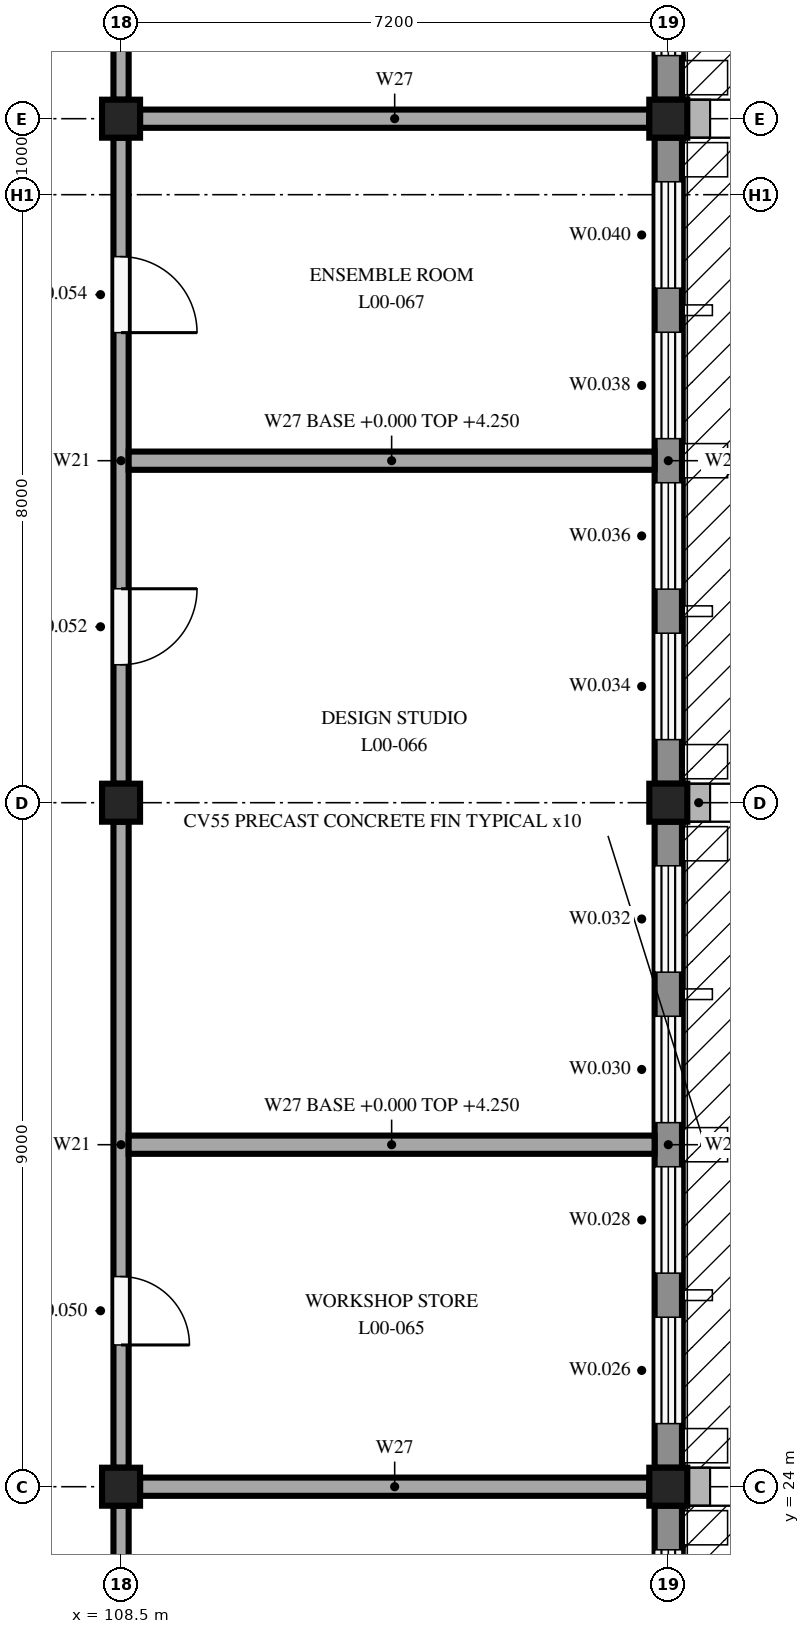
"""IFC4 building model, lengths in metres.
Left out: names, types, materials, properties, quantities, classifications, styles, units other than length and angle.
Written with IfcOpenShell. Run it as: python <this file> out.ifc"""

import sys

from ifc_helpers import new_model, si_unit, direction, frame, frame_2d, origin, origin_2d, place, context, subcontext, project, spatial, rectangle, extrude, element, fill, save


model = new_model("IFC4")
c1 = context("Model", 3, precision=1e-05, world=origin(), true_north=direction((0.0, 1.0)))
c2 = subcontext(c1, "Body", "Model", "MODEL_VIEW")
j1 = project(units=[si_unit("LENGTHUNIT", "METRE"), si_unit("PLANEANGLEUNIT", "RADIAN")], contexts=[c1])
p1 = place(None, origin())
s1 = spatial("IfcSite", under=j1, at=p1, CompositionType="ELEMENT")
p2 = place(p1, origin())
s2 = spatial("IfcBuilding", under=s1, at=p2, CompositionType="ELEMENT")
p3 = place(p2, origin())
s3 = spatial("IfcBuildingStorey", under=s2, at=p3, CompositionType="ELEMENT", Elevation=0.0)
for number, where, z_axis, x_axis in (
    (1, (108.5, 24.0, 0.0), (0.0, 0.0, 1.0), (1.0, 0.0, 0.0)),
    (2, (108.5, 33.0, 0.0), (0.0, 0.0, 1.0), (1.0, 0.0, 0.0)),
    (3, (108.5, 42.0, 0.0), (0.0, 0.0, 1.0), (1.0, 0.0, 0.0)),
    (4, (115.7, 24.0, 0.0), (0.0, 0.0, 1.0), (1.0, 0.0, 0.0)),
    (5, (115.7, 33.0, 0.0), (0.0, 0.0, 1.0), (1.0, 0.0, 0.0)),
    (6, (115.7, 42.0, 0.0), (0.0, 0.0, 1.0), (1.0, 0.0, 0.0)),
):
    element("IfcColumn", number, at=place(p3, frame(where, z_axis=z_axis, x_axis=x_axis)), inside=s3, PredefinedType="COLUMN", context=c2, shape_type="SweptSolid", body=[
        extrude(rectangle(XDim=0.5, YDim=0.5, at=origin_2d()), origin(), (0.0, 0.0, 1.0), 4.25),
    ])
p4 = place(p3, frame((115.7, 23.75, 0.0), z_axis=(0.0, 0.0, 1.0), x_axis=(0.0, -1.0, 0.0)))
e7 = element("IfcWall", 7, at=p4, inside=s3, PredefinedType="STANDARD", context=c2, shape_type="SweptSolid", body=[
    extrude(rectangle(XDim=8.5, YDim=0.36, at=frame_2d((4.25, 0.0))), origin(), (0.0, 0.0, 1.0), 3.75),
])
p5 = place(p4, frame((6.52, 0.0, 1.2)))
e8 = element("IfcOpeningElement", 8, at=p5, cuts=e7, PredefinedType="OPENING", context=c2, shape_type="SweptSolid", body=[
    extrude(rectangle(XDim=1.4, YDim=2.4, at=frame_2d((0.7, 1.2))), frame((0.0, 0.19, 0.0), z_axis=(0.0, -1.0, 0.0), x_axis=(1.0, 0.0, 0.0)), (0.0, 0.0, 1.0), 0.38),
])
p6 = place(p4, frame((4.54, 0.0, 1.2)))
e9 = element("IfcOpeningElement", 9, at=p6, cuts=e7, PredefinedType="OPENING", context=c2, shape_type="SweptSolid", body=[
    extrude(rectangle(XDim=1.4, YDim=2.4, at=frame_2d((0.7, 1.2))), frame((0.0, 0.19, 0.0), z_axis=(0.0, -1.0, 0.0), x_axis=(1.0, 0.0, 0.0)), (0.0, 0.0, 1.0), 0.38),
])
p7 = place(p4, frame((2.56, 0.0, 1.2)))
e10 = element("IfcOpeningElement", 10, at=p7, cuts=e7, PredefinedType="OPENING", context=c2, shape_type="SweptSolid", body=[
    extrude(rectangle(XDim=1.4, YDim=2.4, at=frame_2d((0.7, 1.2))), frame((0.0, 0.19, 0.0), z_axis=(0.0, -1.0, 0.0), x_axis=(1.0, 0.0, 0.0)), (0.0, 0.0, 1.0), 0.38),
])
p8 = place(p4, frame((0.58, 0.0, 1.2)))
e11 = element("IfcOpeningElement", 11, at=p8, cuts=e7, PredefinedType="OPENING", context=c2, shape_type="SweptSolid", body=[
    extrude(rectangle(XDim=1.4, YDim=2.4, at=frame_2d((0.7, 1.2))), frame((0.0, 0.19, 0.0), z_axis=(0.0, -1.0, 0.0), x_axis=(1.0, 0.0, 0.0)), (0.0, 0.0, 1.0), 0.38),
])
p9 = place(p3, frame((115.7, 32.75, 0.0), z_axis=(0.0, 0.0, 1.0), x_axis=(0.0, -1.0, 0.0)))
e12 = element("IfcWall", 12, at=p9, inside=s3, PredefinedType="STANDARD", context=c2, shape_type="SweptSolid", body=[
    extrude(rectangle(XDim=8.5, YDim=0.36, at=frame_2d((4.25, 0.0))), origin(), (0.0, 0.0, 1.0), 3.75),
])
p10 = place(p9, frame((6.52, 0.0, 1.2)))
e13 = element("IfcOpeningElement", 13, at=p10, cuts=e12, PredefinedType="OPENING", context=c2, shape_type="SweptSolid", body=[
    extrude(rectangle(XDim=1.4, YDim=2.4, at=frame_2d((0.7, 1.2))), frame((0.0, 0.19, 0.0), z_axis=(0.0, -1.0, 0.0), x_axis=(1.0, 0.0, 0.0)), (0.0, 0.0, 1.0), 0.38),
])
p11 = place(p9, frame((4.54, 0.0, 1.2)))
e14 = element("IfcOpeningElement", 14, at=p11, cuts=e12, PredefinedType="OPENING", context=c2, shape_type="SweptSolid", body=[
    extrude(rectangle(XDim=1.4, YDim=2.4, at=frame_2d((0.7, 1.2))), frame((0.0, 0.19, 0.0), z_axis=(0.0, -1.0, 0.0), x_axis=(1.0, 0.0, 0.0)), (0.0, 0.0, 1.0), 0.38),
])
p12 = place(p9, frame((2.56, 0.0, 1.2)))
e15 = element("IfcOpeningElement", 15, at=p12, cuts=e12, PredefinedType="OPENING", context=c2, shape_type="SweptSolid", body=[
    extrude(rectangle(XDim=1.4, YDim=2.4, at=frame_2d((0.7, 1.2))), frame((0.0, 0.19, 0.0), z_axis=(0.0, -1.0, 0.0), x_axis=(1.0, 0.0, 0.0)), (0.0, 0.0, 1.0), 0.38),
])
p13 = place(p9, frame((0.58, 0.0, 1.2)))
e16 = element("IfcOpeningElement", 16, at=p13, cuts=e12, PredefinedType="OPENING", context=c2, shape_type="SweptSolid", body=[
    extrude(rectangle(XDim=1.4, YDim=2.4, at=frame_2d((0.7, 1.2))), frame((0.0, 0.19, 0.0), z_axis=(0.0, -1.0, 0.0), x_axis=(1.0, 0.0, 0.0)), (0.0, 0.0, 1.0), 0.38),
])
p14 = place(p3, frame((115.7, 41.75, 0.0), z_axis=(0.0, 0.0, 1.0), x_axis=(0.0, -1.0, 0.0)))
e17 = element("IfcWall", 17, at=p14, inside=s3, PredefinedType="STANDARD", context=c2, shape_type="SweptSolid", body=[
    extrude(rectangle(XDim=8.5, YDim=0.36, at=frame_2d((4.25, 0.0))), origin(), (0.0, 0.0, 1.0), 3.75),
])
p15 = place(p14, frame((6.52, 0.0, 1.2)))
e18 = element("IfcOpeningElement", 18, at=p15, cuts=e17, PredefinedType="OPENING", context=c2, shape_type="SweptSolid", body=[
    extrude(rectangle(XDim=1.4, YDim=2.4, at=frame_2d((0.7, 1.2))), frame((0.0, 0.19, 0.0), z_axis=(0.0, -1.0, 0.0), x_axis=(1.0, 0.0, 0.0)), (0.0, 0.0, 1.0), 0.38),
])
p16 = place(p14, frame((4.54, 0.0, 1.2)))
e19 = element("IfcOpeningElement", 19, at=p16, cuts=e17, PredefinedType="OPENING", context=c2, shape_type="SweptSolid", body=[
    extrude(rectangle(XDim=1.4, YDim=2.4, at=frame_2d((0.7, 1.2))), frame((0.0, 0.19, 0.0), z_axis=(0.0, -1.0, 0.0), x_axis=(1.0, 0.0, 0.0)), (0.0, 0.0, 1.0), 0.38),
])
p17 = place(p14, frame((2.56, 0.0, 1.2)))
e20 = element("IfcOpeningElement", 20, at=p17, cuts=e17, PredefinedType="OPENING", context=c2, shape_type="SweptSolid", body=[
    extrude(rectangle(XDim=1.4, YDim=2.4, at=frame_2d((0.7, 1.2))), frame((0.0, 0.19, 0.0), z_axis=(0.0, -1.0, 0.0), x_axis=(1.0, 0.0, 0.0)), (0.0, 0.0, 1.0), 0.38),
])
p18 = place(p14, frame((0.58, 0.0, 1.2)))
e21 = element("IfcOpeningElement", 21, at=p18, cuts=e17, PredefinedType="OPENING", context=c2, shape_type="SweptSolid", body=[
    extrude(rectangle(XDim=1.4, YDim=2.4, at=frame_2d((0.7, 1.2))), frame((0.0, 0.19, 0.0), z_axis=(0.0, -1.0, 0.0), x_axis=(1.0, 0.0, 0.0)), (0.0, 0.0, 1.0), 0.38),
])
p19 = place(p3, frame((115.7, 50.75, 0.0), z_axis=(0.0, 0.0, 1.0), x_axis=(0.0, -1.0, 0.0)))
e22 = element("IfcWall", 22, at=p19, inside=s3, PredefinedType="STANDARD", context=c2, shape_type="SweptSolid", body=[
    extrude(rectangle(XDim=8.5, YDim=0.36, at=frame_2d((4.25, 0.0))), origin(), (0.0, 0.0, 1.0), 3.75),
])
p20 = place(p19, frame((6.52, 0.0, 0.6)))
e23 = element("IfcOpeningElement", 23, at=p20, cuts=e22, PredefinedType="OPENING", context=c2, shape_type="SweptSolid", body=[
    extrude(rectangle(XDim=1.4, YDim=3.0, at=frame_2d((0.7, 1.5))), frame((0.0, 0.19, 0.0), z_axis=(0.0, -1.0, 0.0), x_axis=(1.0, 0.0, 0.0)), (0.0, 0.0, 1.0), 0.38),
])
p21 = place(p19, frame((4.54, 0.0, 0.6)))
e24 = element("IfcOpeningElement", 24, at=p21, cuts=e22, PredefinedType="OPENING", context=c2, shape_type="SweptSolid", body=[
    extrude(rectangle(XDim=1.4, YDim=3.0, at=frame_2d((0.7, 1.5))), frame((0.0, 0.19, 0.0), z_axis=(0.0, -1.0, 0.0), x_axis=(1.0, 0.0, 0.0)), (0.0, 0.0, 1.0), 0.38),
])
p22 = place(p19, frame((2.56, 0.0, 0.6)))
e25 = element("IfcOpeningElement", 25, at=p22, cuts=e22, PredefinedType="OPENING", context=c2, shape_type="SweptSolid", body=[
    extrude(rectangle(XDim=1.4, YDim=3.0, at=frame_2d((0.7, 1.5))), frame((0.0, 0.19, 0.0), z_axis=(0.0, -1.0, 0.0), x_axis=(1.0, 0.0, 0.0)), (0.0, 0.0, 1.0), 0.38),
])
p23 = place(p19, frame((0.58, 0.0, 0.6)))
e26 = element("IfcOpeningElement", 26, at=p23, cuts=e22, PredefinedType="OPENING", context=c2, shape_type="SweptSolid", body=[
    extrude(rectangle(XDim=1.4, YDim=3.0, at=frame_2d((0.7, 1.5))), frame((0.0, 0.19, 0.0), z_axis=(0.0, -1.0, 0.0), x_axis=(1.0, 0.0, 0.0)), (0.0, 0.0, 1.0), 0.38),
])
p24 = place(p3, frame((108.5, 23.75, 0.0), z_axis=(0.0, 0.0, 1.0), x_axis=(0.0, -1.0, 0.0)))
e27 = element("IfcWall", 27, at=p24, inside=s3, PredefinedType="PARTITIONING", context=c2, shape_type="SweptSolid", body=[
    extrude(rectangle(XDim=8.5, YDim=0.2, at=frame_2d((4.25, 0.0))), origin(), (0.0, 0.0, 1.0), 3.8),
])
p25 = place(p24, frame((3.65, 0.0, 0.0)))
e28 = element("IfcOpeningElement", 28, at=p25, cuts=e27, PredefinedType="OPENING", context=c2, shape_type="SweptSolid", body=[
    extrude(rectangle(XDim=1.2, YDim=2.1, at=frame_2d((0.6, 1.05))), frame((0.0, 0.11, 0.0), z_axis=(0.0, -1.0, 0.0), x_axis=(1.0, 0.0, 0.0)), (0.0, 0.0, 1.0), 0.22),
])
p26 = place(p3, frame((108.5, 32.75, 0.0), z_axis=(0.0, 0.0, 1.0), x_axis=(0.0, -1.0, 0.0)))
e29 = element("IfcWall", 29, at=p26, inside=s3, PredefinedType="PARTITIONING", context=c2, shape_type="SweptSolid", body=[
    extrude(rectangle(XDim=8.5, YDim=0.2, at=frame_2d((4.25, 0.0))), origin(), (0.0, 0.0, 1.0), 3.8),
])
p27 = place(p26, frame((5.985, 0.0, 0.0)))
e30 = element("IfcOpeningElement", 30, at=p27, cuts=e29, PredefinedType="OPENING", context=c2, shape_type="SweptSolid", body=[
    extrude(rectangle(XDim=0.9, YDim=2.1, at=frame_2d((0.45, 1.05))), frame((0.0, 0.11, 0.0), z_axis=(0.0, -1.0, 0.0), x_axis=(1.0, 0.0, 0.0)), (0.0, 0.0, 1.0), 0.22),
])
p28 = place(p3, frame((108.5, 41.75, 0.0), z_axis=(0.0, 0.0, 1.0), x_axis=(0.0, -1.0, 0.0)))
e31 = element("IfcWall", 31, at=p28, inside=s3, PredefinedType="PARTITIONING", context=c2, shape_type="SweptSolid", body=[
    extrude(rectangle(XDim=8.5, YDim=0.2, at=frame_2d((4.25, 0.0))), origin(), (0.0, 0.0, 1.0), 3.8),
])
p29 = place(p28, frame((5.935, 0.0, 0.0)))
e32 = element("IfcOpeningElement", 32, at=p29, cuts=e31, PredefinedType="OPENING", context=c2, shape_type="SweptSolid", body=[
    extrude(rectangle(XDim=1.0, YDim=2.1, at=frame_2d((0.5, 1.05))), frame((0.0, 0.11, 0.0), z_axis=(0.0, -1.0, 0.0), x_axis=(1.0, 0.0, 0.0)), (0.0, 0.0, 1.0), 0.22),
])
p30 = place(p28, frame((1.565, 0.0, 0.0)))
e33 = element("IfcOpeningElement", 33, at=p30, cuts=e31, PredefinedType="OPENING", context=c2, shape_type="SweptSolid", body=[
    extrude(rectangle(XDim=1.0, YDim=2.1, at=frame_2d((0.5, 1.05))), frame((0.0, 0.11, 0.0), z_axis=(0.0, -1.0, 0.0), x_axis=(1.0, 0.0, 0.0)), (0.0, 0.0, 1.0), 0.22),
])
p31 = place(p3, frame((108.5, 50.75, 0.0), z_axis=(0.0, 0.0, 1.0), x_axis=(0.0, -1.0, 0.0)))
e34 = element("IfcWall", 34, at=p31, inside=s3, PredefinedType="PARTITIONING", context=c2, shape_type="SweptSolid", body=[
    extrude(rectangle(XDim=8.5, YDim=0.2, at=frame_2d((4.25, 0.0))), origin(), (0.0, 0.0, 1.0), 3.8),
])
p32 = place(p31, frame((3.75, 0.0, 0.0)))
e35 = element("IfcOpeningElement", 35, at=p32, cuts=e34, PredefinedType="OPENING", context=c2, shape_type="SweptSolid", body=[
    extrude(rectangle(XDim=1.0, YDim=2.1, at=frame_2d((0.5, 1.05))), frame((0.0, 0.11, 0.0), z_axis=(0.0, -1.0, 0.0), x_axis=(1.0, 0.0, 0.0)), (0.0, 0.0, 1.0), 0.22),
])
p33 = place(p3, frame((108.75, 24.0, 0.0), z_axis=(0.0, 0.0, 1.0), x_axis=(1.0, 0.0, 0.0)))
e36 = element("IfcWall", 36, at=p33, inside=s3, PredefinedType="PARTITIONING", context=c2, shape_type="SweptSolid", body=[
    extrude(rectangle(XDim=6.7, YDim=0.24, at=frame_2d((3.35, 0.0))), origin(), (0.0, 0.0, 1.0), 3.8),
])
for number, where, z_axis, x_axis in (
    (37, (108.6, 28.5, 0.0), (0.0, 0.0, 1.0), (1.0, 0.0, 0.0)),
    (38, (108.6, 37.5, 0.0), (0.0, 0.0, 1.0), (1.0, 0.0, 0.0)),
):
    element("IfcWall", number, at=place(p3, frame(where, z_axis=z_axis, x_axis=x_axis)), inside=s3, PredefinedType="PARTITIONING", context=c2, shape_type="SweptSolid", body=[
        extrude(rectangle(XDim=6.92, YDim=0.24, at=frame_2d((3.46, 0.0))), origin(), (0.0, 0.0, 1.0), 4.25),
    ])
p34 = place(p3, frame((108.75, 42.0, 0.0), z_axis=(0.0, 0.0, 1.0), x_axis=(1.0, 0.0, 0.0)))
e39 = element("IfcWall", 39, at=p34, inside=s3, PredefinedType="PARTITIONING", context=c2, shape_type="SweptSolid", body=[
    extrude(rectangle(XDim=6.7, YDim=0.24, at=frame_2d((3.35, 0.0))), origin(), (0.0, 0.0, 1.0), 3.8),
])
p35 = place(p8, origin())
e40 = element("IfcWindow", 40, at=p35, inside=s3, PartitioningType="DOUBLE_PANEL_VERTICAL", PredefinedType="WINDOW", context=c2, shape_type="SweptSolid", body=[
    extrude(rectangle(XDim=1.4, YDim=2.4, at=frame_2d((0.7, 1.2))), frame((0.0, 0.03, 0.0), z_axis=(0.0, -1.0, 0.0), x_axis=(1.0, 0.0, 0.0)), (0.0, 0.0, 1.0), 0.06),
])
fill(e11, e40)
p36 = place(p10, origin())
e41 = element("IfcWindow", 41, at=p36, inside=s3, PartitioningType="DOUBLE_PANEL_VERTICAL", PredefinedType="WINDOW", context=c2, shape_type="SweptSolid", body=[
    extrude(rectangle(XDim=1.4, YDim=2.4, at=frame_2d((0.7, 1.2))), frame((0.0, 0.03, 0.0), z_axis=(0.0, -1.0, 0.0), x_axis=(1.0, 0.0, 0.0)), (0.0, 0.0, 1.0), 0.06),
])
fill(e13, e41)
p37 = place(p11, origin())
e42 = element("IfcWindow", 42, at=p37, inside=s3, PartitioningType="DOUBLE_PANEL_VERTICAL", PredefinedType="WINDOW", context=c2, shape_type="SweptSolid", body=[
    extrude(rectangle(XDim=1.4, YDim=2.4, at=frame_2d((0.7, 1.2))), frame((0.0, 0.03, 0.0), z_axis=(0.0, -1.0, 0.0), x_axis=(1.0, 0.0, 0.0)), (0.0, 0.0, 1.0), 0.06),
])
fill(e14, e42)
p38 = place(p12, origin())
e43 = element("IfcWindow", 43, at=p38, inside=s3, PartitioningType="DOUBLE_PANEL_VERTICAL", PredefinedType="WINDOW", context=c2, shape_type="SweptSolid", body=[
    extrude(rectangle(XDim=1.4, YDim=2.4, at=frame_2d((0.7, 1.2))), frame((0.0, 0.03, 0.0), z_axis=(0.0, -1.0, 0.0), x_axis=(1.0, 0.0, 0.0)), (0.0, 0.0, 1.0), 0.06),
])
fill(e15, e43)
p39 = place(p13, origin())
e44 = element("IfcWindow", 44, at=p39, inside=s3, PartitioningType="DOUBLE_PANEL_VERTICAL", PredefinedType="WINDOW", context=c2, shape_type="SweptSolid", body=[
    extrude(rectangle(XDim=1.4, YDim=2.4, at=frame_2d((0.7, 1.2))), frame((0.0, 0.03, 0.0), z_axis=(0.0, -1.0, 0.0), x_axis=(1.0, 0.0, 0.0)), (0.0, 0.0, 1.0), 0.06),
])
fill(e16, e44)
p40 = place(p15, origin())
e45 = element("IfcWindow", 45, at=p40, inside=s3, PartitioningType="DOUBLE_PANEL_VERTICAL", PredefinedType="WINDOW", context=c2, shape_type="SweptSolid", body=[
    extrude(rectangle(XDim=1.4, YDim=2.4, at=frame_2d((0.7, 1.2))), frame((0.0, 0.03, 0.0), z_axis=(0.0, -1.0, 0.0), x_axis=(1.0, 0.0, 0.0)), (0.0, 0.0, 1.0), 0.06),
])
fill(e18, e45)
p41 = place(p16, origin())
e46 = element("IfcWindow", 46, at=p41, inside=s3, PartitioningType="DOUBLE_PANEL_VERTICAL", PredefinedType="WINDOW", context=c2, shape_type="SweptSolid", body=[
    extrude(rectangle(XDim=1.4, YDim=2.4, at=frame_2d((0.7, 1.2))), frame((0.0, 0.03, 0.0), z_axis=(0.0, -1.0, 0.0), x_axis=(1.0, 0.0, 0.0)), (0.0, 0.0, 1.0), 0.06),
])
fill(e19, e46)
p42 = place(p17, origin())
e47 = element("IfcWindow", 47, at=p42, inside=s3, PartitioningType="DOUBLE_PANEL_VERTICAL", PredefinedType="WINDOW", context=c2, shape_type="SweptSolid", body=[
    extrude(rectangle(XDim=1.4, YDim=2.4, at=frame_2d((0.7, 1.2))), frame((0.0, 0.03, 0.0), z_axis=(0.0, -1.0, 0.0), x_axis=(1.0, 0.0, 0.0)), (0.0, 0.0, 1.0), 0.06),
])
fill(e20, e47)
p43 = place(p18, origin())
e48 = element("IfcWindow", 48, at=p43, inside=s3, PartitioningType="DOUBLE_PANEL_VERTICAL", PredefinedType="WINDOW", context=c2, shape_type="SweptSolid", body=[
    extrude(rectangle(XDim=1.4, YDim=2.4, at=frame_2d((0.7, 1.2))), frame((0.0, 0.03, 0.0), z_axis=(0.0, -1.0, 0.0), x_axis=(1.0, 0.0, 0.0)), (0.0, 0.0, 1.0), 0.06),
])
fill(e21, e48)
p44 = place(p20, origin())
e49 = element("IfcWindow", 49, at=p44, inside=s3, PartitioningType="DOUBLE_PANEL_VERTICAL", PredefinedType="WINDOW", context=c2, shape_type="SweptSolid", body=[
    extrude(rectangle(XDim=1.4, YDim=3.0, at=frame_2d((0.7, 1.5))), frame((0.0, 0.03, 0.0), z_axis=(0.0, -1.0, 0.0), x_axis=(1.0, 0.0, 0.0)), (0.0, 0.0, 1.0), 0.06),
])
fill(e23, e49)
p45 = place(p27, origin())
e50 = element("IfcDoor", 50, at=p45, inside=s3, OperationType="SINGLE_SWING_RIGHT", PredefinedType="DOOR", context=c2, shape_type="SweptSolid", body=[
    extrude(rectangle(XDim=0.9, YDim=2.1, at=frame_2d((0.45, 1.05))), frame((0.0, 0.025, 0.0), z_axis=(0.0, -1.0, 0.0), x_axis=(1.0, 0.0, 0.0)), (0.0, 0.0, 1.0), 0.05),
])
fill(e30, e50)
p46 = place(p29, origin())
e51 = element("IfcDoor", 51, at=p46, inside=s3, OperationType="SINGLE_SWING_LEFT", PredefinedType="DOOR", context=c2, shape_type="SweptSolid", body=[
    extrude(rectangle(XDim=1.0, YDim=2.1, at=frame_2d((0.5, 1.05))), frame((0.0, 0.025, 0.0), z_axis=(0.0, -1.0, 0.0), x_axis=(1.0, 0.0, 0.0)), (0.0, 0.0, 1.0), 0.05),
])
fill(e32, e51)
p47 = place(p30, origin())
e52 = element("IfcDoor", 52, at=p47, inside=s3, OperationType="SINGLE_SWING_RIGHT", PredefinedType="DOOR", context=c2, shape_type="SweptSolid", body=[
    extrude(rectangle(XDim=1.0, YDim=2.1, at=frame_2d((0.5, 1.05))), frame((0.0, 0.025, 0.0), z_axis=(0.0, -1.0, 0.0), x_axis=(1.0, 0.0, 0.0)), (0.0, 0.0, 1.0), 0.05),
])
fill(e33, e52)
save(model, sys.argv[1])
